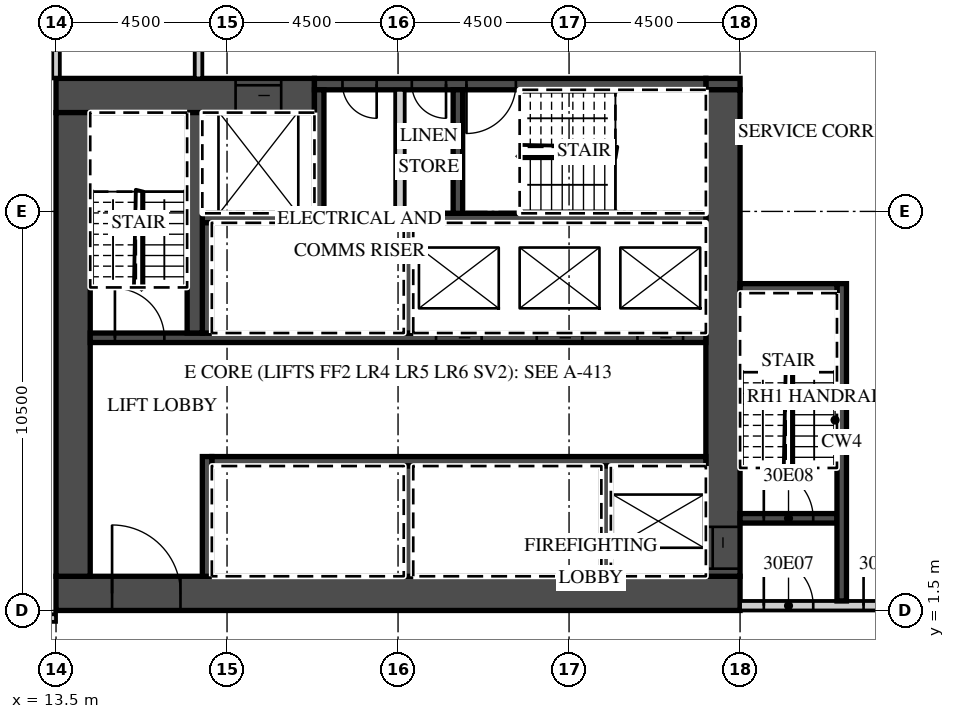
"""IFC4 building model, lengths in metres.
Left out: names, types, materials, properties, quantities, classifications, styles, units other than length and angle.
Written with IfcOpenShell. Run it as: python <this file> out.ifc"""

import sys

from ifc_helpers import new_model, si_unit, direction, frame, frame_2d, origin, place, context, subcontext, project, spatial, rectangle, extrude, element, fill, save


model = new_model("IFC4")
c1 = context("Model", 3, precision=1e-05, world=origin(), true_north=direction((0.0, 1.0)))
c2 = subcontext(c1, "Body", "Model", "MODEL_VIEW")
j1 = project(units=[si_unit("LENGTHUNIT", "METRE"), si_unit("PLANEANGLEUNIT", "RADIAN")], contexts=[c1])
p1 = place(None, origin())
s1 = spatial("IfcSite", under=j1, at=p1, CompositionType="ELEMENT")
p2 = place(p1, origin())
s2 = spatial("IfcBuilding", under=s1, at=p2, CompositionType="ELEMENT")
p3 = place(p2, frame((0.0, 0.0, 133.9)))
s3 = spatial("IfcBuildingStorey", under=s2, at=p3, CompositionType="ELEMENT", Elevation=133.9)
p4 = place(p3, frame((13.5, 15.5, 0.0), z_axis=(0.0, 0.0, 1.0), x_axis=(0.0, 1.0, 0.0)))
e1 = element("IfcWall", 1, at=p4, inside=s3, PredefinedType="PARTITIONING", context=c2, shape_type="SweptSolid", body=[
    extrude(rectangle(XDim=7.162, YDim=0.2, at=frame_2d((3.581, 0.0))), origin(), (0.0, 0.0, 1.0), 3.02),
])
p5 = place(p3, frame((-39.316, 1.3, 0.0), z_axis=(0.0, 0.0, 1.0), x_axis=(1.0, 0.0, 0.0)))
e2 = element("IfcWall", 2, at=p5, inside=s3, PredefinedType="PARTITIONING", context=c2, shape_type="SweptSolid", body=[
    extrude(rectangle(XDim=52.816, YDim=0.2, at=frame_2d((26.408, 0.0))), origin(), (0.0, 0.0, 1.0), 3.02),
])
p6 = place(p5, frame((0.15, 0.0, 0.0)))
e3 = element("IfcOpeningElement", 3, at=p6, cuts=e2, PredefinedType="OPENING", context=c2, shape_type="SweptSolid", body=[
    extrude(rectangle(XDim=0.9, YDim=2.1, at=frame_2d((0.45, 1.05))), frame((0.0, 0.11, 0.0), z_axis=(0.0, -1.0, 0.0), x_axis=(1.0, 0.0, 0.0)), (0.0, 0.0, 1.0), 0.22),
])
p7 = place(p5, frame((8.679, 0.0, 0.0)))
e4 = element("IfcOpeningElement", 4, at=p7, cuts=e2, PredefinedType="OPENING", context=c2, shape_type="SweptSolid", body=[
    extrude(rectangle(XDim=1.2, YDim=2.1, at=frame_2d((0.6, 1.05))), frame((0.0, 0.11, 0.0), z_axis=(0.0, -1.0, 0.0), x_axis=(1.0, 0.0, 0.0)), (0.0, 0.0, 1.0), 0.22),
])
p8 = place(p5, frame((14.754, 0.0, 0.0)))
e5 = element("IfcOpeningElement", 5, at=p8, cuts=e2, PredefinedType="OPENING", context=c2, shape_type="SweptSolid", body=[
    extrude(rectangle(XDim=1.2, YDim=2.1, at=frame_2d((0.6, 1.05))), frame((0.0, 0.11, 0.0), z_axis=(0.0, -1.0, 0.0), x_axis=(1.0, 0.0, 0.0)), (0.0, 0.0, 1.0), 0.22),
])
p9 = place(p5, frame((26.678, 0.0, 0.0)))
e6 = element("IfcOpeningElement", 6, at=p9, cuts=e2, PredefinedType="OPENING", context=c2, shape_type="SweptSolid", body=[
    extrude(rectangle(XDim=1.2, YDim=2.1, at=frame_2d((0.6, 1.05))), frame((0.0, 0.11, 0.0), z_axis=(0.0, -1.0, 0.0), x_axis=(1.0, 0.0, 0.0)), (0.0, 0.0, 1.0), 0.22),
])
p10 = place(p5, frame((33.266, 0.0, 0.0)))
e7 = element("IfcOpeningElement", 7, at=p10, cuts=e2, PredefinedType="OPENING", context=c2, shape_type="SweptSolid", body=[
    extrude(rectangle(XDim=1.0, YDim=2.1, at=frame_2d((0.5, 1.05))), frame((0.0, 0.11, 0.0), z_axis=(0.0, -1.0, 0.0), x_axis=(1.0, 0.0, 0.0)), (0.0, 0.0, 1.0), 0.22),
])
p11 = place(p5, frame((37.741, 0.0, 0.0)))
e8 = element("IfcOpeningElement", 8, at=p11, cuts=e2, PredefinedType="OPENING", context=c2, shape_type="SweptSolid", body=[
    extrude(rectangle(XDim=1.0, YDim=2.1, at=frame_2d((0.5, 1.05))), frame((0.0, 0.11, 0.0), z_axis=(0.0, -1.0, 0.0), x_axis=(1.0, 0.0, 0.0)), (0.0, 0.0, 1.0), 0.22),
])
p12 = place(p5, frame((41.754, 0.0, 0.0)))
e9 = element("IfcOpeningElement", 9, at=p12, cuts=e2, PredefinedType="OPENING", context=c2, shape_type="SweptSolid", body=[
    extrude(rectangle(XDim=1.2, YDim=2.1, at=frame_2d((0.6, 1.05))), frame((0.0, 0.11, 0.0), z_axis=(0.0, -1.0, 0.0), x_axis=(1.0, 0.0, 0.0)), (0.0, 0.0, 1.0), 0.22),
])
p13 = place(p5, frame((51.241, 0.0, 0.0)))
e10 = element("IfcOpeningElement", 10, at=p13, cuts=e2, PredefinedType="OPENING", context=c2, shape_type="SweptSolid", body=[
    extrude(rectangle(XDim=1.0, YDim=2.1, at=frame_2d((0.5, 1.05))), frame((0.0, 0.11, 0.0), z_axis=(0.0, -1.0, 0.0), x_axis=(1.0, 0.0, 0.0)), (0.0, 0.0, 1.0), 0.22),
])
p14 = place(p3, frame((13.5, 1.95, 0.0), z_axis=(0.0, 0.0, 1.0), x_axis=(1.0, 0.0, 0.0)))
e11 = element("IfcWall", 11, at=p14, inside=s3, PredefinedType="SHEAR", context=c2, shape_type="SweptSolid", body=[
    extrude(rectangle(XDim=18.0, YDim=0.9, at=frame_2d((9.0, 0.0))), origin(), (0.0, 0.0, 1.0), 3.02),
])
p15 = place(p14, frame((1.475, 0.0, 0.0)))
e12 = element("IfcOpeningElement", 12, at=p15, cuts=e11, PredefinedType="OPENING", context=c2, shape_type="SweptSolid", body=[
    extrude(rectangle(XDim=1.8, YDim=2.1, at=frame_2d((0.9, 1.05))), frame((0.0, 0.46, 0.0), z_axis=(0.0, -1.0, 0.0), x_axis=(1.0, 0.0, 0.0)), (0.0, 0.0, 1.0), 0.92),
])
p16 = place(p3, frame((13.5, 15.05, 0.0), z_axis=(0.0, 0.0, 1.0), x_axis=(1.0, 0.0, 0.0)))
e13 = element("IfcWall", 13, at=p16, inside=s3, PredefinedType="SHEAR", context=c2, shape_type="SweptSolid", body=[
    extrude(rectangle(XDim=6.8, YDim=0.9, at=frame_2d((3.4, 0.0))), origin(), (0.0, 0.0, 1.0), 3.02),
])
p17 = place(p16, frame((4.725, 0.0, 0.0)))
e14 = element("IfcOpeningElement", 14, at=p17, cuts=e13, PredefinedType="OPENING", context=c2, shape_type="SweptSolid", body=[
    extrude(rectangle(XDim=1.2, YDim=2.1, at=frame_2d((0.6, 1.05))), frame((0.0, 0.46, 0.0), z_axis=(0.0, -1.0, 0.0), x_axis=(1.0, 0.0, 0.0)), (0.0, 0.0, 1.0), 0.92),
])
p18 = place(p3, frame((30.6, 15.35, 0.0), z_axis=(0.0, 0.0, 1.0), x_axis=(1.0, 0.0, 0.0)))
e15 = element("IfcWall", 15, at=p18, inside=s3, PredefinedType="SHEAR", context=c2, shape_type="SweptSolid", body=[
    extrude(rectangle(XDim=0.9, YDim=0.3, at=frame_2d((0.45, 0.0))), origin(), (0.0, 0.0, 1.0), 3.02),
])
p19 = place(p3, frame((20.3, 15.35, 0.0), z_axis=(0.0, 0.0, 1.0), x_axis=(1.0, 0.0, 0.0)))
e16 = element("IfcWall", 16, at=p19, inside=s3, PredefinedType="SHEAR", context=c2, shape_type="SweptSolid", body=[
    extrude(rectangle(XDim=10.3, YDim=0.3, at=frame_2d((5.15, 0.0))), origin(), (0.0, 0.0, 1.0), 3.02),
])
p20 = place(p19, frame((4.0, 0.0, 0.0)))
e17 = element("IfcOpeningElement", 17, at=p20, cuts=e16, PredefinedType="OPENING", context=c2, shape_type="SweptSolid", body=[
    extrude(rectangle(XDim=1.3, YDim=2.1, at=frame_2d((0.65, 1.05))), frame((0.0, 0.16, 0.0), z_axis=(0.0, -1.0, 0.0), x_axis=(1.0, 0.0, 0.0)), (0.0, 0.0, 1.0), 0.32),
])
p21 = place(p19, frame((2.562, 0.0, 0.0)))
e18 = element("IfcOpeningElement", 18, at=p21, cuts=e16, PredefinedType="OPENING", context=c2, shape_type="SweptSolid", body=[
    extrude(rectangle(XDim=0.9, YDim=2.1, at=frame_2d((0.45, 1.05))), frame((0.0, 0.16, 0.0), z_axis=(0.0, -1.0, 0.0), x_axis=(1.0, 0.0, 0.0)), (0.0, 0.0, 1.0), 0.32),
])
p22 = place(p19, frame((0.738, 0.0, 0.0)))
e19 = element("IfcOpeningElement", 19, at=p22, cuts=e16, PredefinedType="OPENING", context=c2, shape_type="SweptSolid", body=[
    extrude(rectangle(XDim=0.9, YDim=2.1, at=frame_2d((0.45, 1.05))), frame((0.0, 0.16, 0.0), z_axis=(0.0, -1.0, 0.0), x_axis=(1.0, 0.0, 0.0)), (0.0, 0.0, 1.0), 0.32),
])
p23 = place(p3, frame((31.05, 2.4, 0.0), z_axis=(0.0, 0.0, 1.0), x_axis=(0.0, 1.0, 0.0)))
e20 = element("IfcWall", 20, at=p23, inside=s3, PredefinedType="SHEAR", context=c2, shape_type="SweptSolid", body=[
    extrude(rectangle(XDim=12.8, YDim=0.9, at=frame_2d((6.4, 0.0))), origin(), (0.0, 0.0, 1.0), 3.02),
])
p24 = place(p23, frame((0.2, 0.0, 0.0)))
e21 = element("IfcOpeningElement", 21, at=p24, cuts=e20, PredefinedType="OPENING", context=c2, shape_type="SweptSolid", body=[
    extrude(rectangle(XDim=1.1, YDim=2.1, at=frame_2d((0.55, 1.05))), frame((0.0, 0.46, 0.0), z_axis=(0.0, -1.0, 0.0), x_axis=(1.0, 0.0, 0.0)), (0.0, 0.0, 1.0), 0.92),
])
p25 = place(p3, frame((13.95, 2.4, 0.0), z_axis=(0.0, 0.0, 1.0), x_axis=(0.0, 1.0, 0.0)))
e22 = element("IfcWall", 22, at=p25, inside=s3, PredefinedType="SHEAR", context=c2, shape_type="SweptSolid", body=[
    extrude(rectangle(XDim=12.2, YDim=0.9, at=frame_2d((6.1, 0.0))), origin(), (0.0, 0.0, 1.0), 3.02),
])
p26 = place(p3, frame((17.6, 5.425, 0.0), z_axis=(0.0, 0.0, 1.0), x_axis=(1.0, 0.0, 0.0)))
e23 = element("IfcWall", 23, at=p26, inside=s3, PredefinedType="SHEAR", context=c2, shape_type="SweptSolid", body=[
    extrude(rectangle(XDim=13.0, YDim=0.25, at=frame_2d((6.5, 0.0))), origin(), (0.0, 0.0, 1.0), 3.02),
])
p27 = place(p3, frame((17.475, 2.4, 0.0), z_axis=(0.0, 0.0, 1.0), x_axis=(0.0, 1.0, 0.0)))
e24 = element("IfcWall", 24, at=p27, inside=s3, PredefinedType="SHEAR", context=c2, shape_type="SweptSolid", body=[
    extrude(rectangle(XDim=3.15, YDim=0.25, at=frame_2d((1.575, 0.0))), origin(), (0.0, 0.0, 1.0), 3.02),
])
for number, where, z_axis, x_axis in (
    (25, (27.975, 2.4, 0.0), (0.0, 0.0, 1.0), (0.0, 1.0, 0.0)),
    (26, (22.775, 2.4, 0.0), (0.0, 0.0, 1.0), (0.0, 1.0, 0.0)),
):
    element("IfcWall", number, at=place(p3, frame(where, z_axis=z_axis, x_axis=x_axis)), inside=s3, PredefinedType="SHEAR", context=c2, shape_type="SweptSolid", body=[
        extrude(rectangle(XDim=2.9, YDim=0.25, at=frame_2d((1.45, 0.0))), origin(), (0.0, 0.0, 1.0), 3.02),
    ])
p28 = place(p3, frame((14.4, 8.675, 0.0), z_axis=(0.0, 0.0, 1.0), x_axis=(1.0, 0.0, 0.0)))
e27 = element("IfcWall", 27, at=p28, inside=s3, PredefinedType="SHEAR", context=c2, shape_type="SweptSolid", body=[
    extrude(rectangle(XDim=16.2, YDim=0.25, at=frame_2d((8.1, 0.0))), origin(), (0.0, 0.0, 1.0), 3.02),
])
p29 = place(p28, frame((14.4, 0.0, 0.0)))
e28 = element("IfcOpeningElement", 28, at=p29, cuts=e27, PredefinedType="OPENING", context=c2, shape_type="SweptSolid", body=[
    extrude(rectangle(XDim=1.2, YDim=2.1, at=frame_2d((0.6, 1.05))), frame((0.0, 0.135, 0.0), z_axis=(0.0, -1.0, 0.0), x_axis=(1.0, 0.0, 0.0)), (0.0, 0.0, 1.0), 0.27),
])
p30 = place(p28, frame((11.75, 0.0, 0.0)))
e29 = element("IfcOpeningElement", 29, at=p30, cuts=e27, PredefinedType="OPENING", context=c2, shape_type="SweptSolid", body=[
    extrude(rectangle(XDim=1.2, YDim=2.1, at=frame_2d((0.6, 1.05))), frame((0.0, 0.135, 0.0), z_axis=(0.0, -1.0, 0.0), x_axis=(1.0, 0.0, 0.0)), (0.0, 0.0, 1.0), 0.27),
])
p31 = place(p28, frame((9.1, 0.0, 0.0)))
e30 = element("IfcOpeningElement", 30, at=p31, cuts=e27, PredefinedType="OPENING", context=c2, shape_type="SweptSolid", body=[
    extrude(rectangle(XDim=1.2, YDim=2.1, at=frame_2d((0.6, 1.05))), frame((0.0, 0.135, 0.0), z_axis=(0.0, -1.0, 0.0), x_axis=(1.0, 0.0, 0.0)), (0.0, 0.0, 1.0), 0.27),
])
p32 = place(p28, frame((0.65, 0.0, 0.0)))
e31 = element("IfcOpeningElement", 31, at=p32, cuts=e27, PredefinedType="OPENING", context=c2, shape_type="SweptSolid", body=[
    extrude(rectangle(XDim=1.3, YDim=2.1, at=frame_2d((0.65, 1.05))), frame((0.0, 0.135, 0.0), z_axis=(0.0, -1.0, 0.0), x_axis=(1.0, 0.0, 0.0)), (0.0, 0.0, 1.0), 0.27),
])
p33 = place(p3, frame((17.35, 11.825, 0.0), z_axis=(0.0, 0.0, 1.0), x_axis=(1.0, 0.0, 0.0)))
e32 = element("IfcWall", 32, at=p33, inside=s3, PredefinedType="SHEAR", context=c2, shape_type="SweptSolid", body=[
    extrude(rectangle(XDim=13.25, YDim=0.25, at=frame_2d((6.625, 0.0))), origin(), (0.0, 0.0, 1.0), 3.02),
])
for number, where, z_axis, x_axis in (
    (33, (17.475, 8.8, 0.0), (0.0, 0.0, 1.0), (0.0, 1.0, 0.0)),
    (34, (22.775, 8.8, 0.0), (0.0, 0.0, 1.0), (0.0, 1.0, 0.0)),
):
    element("IfcWall", number, at=place(p3, frame(where, z_axis=z_axis, x_axis=x_axis)), inside=s3, PredefinedType="SHEAR", context=c2, shape_type="SweptSolid", body=[
        extrude(rectangle(XDim=2.9, YDim=0.25, at=frame_2d((1.45, 0.0))), origin(), (0.0, 0.0, 1.0), 3.02),
    ])
p34 = place(p3, frame((17.15, 8.8, 0.0), z_axis=(0.0, 0.0, 1.0), x_axis=(0.0, 1.0, 0.0)))
e35 = element("IfcWall", 35, at=p34, inside=s3, PredefinedType="SHEAR", context=c2, shape_type="SweptSolid", body=[
    extrude(rectangle(XDim=5.8, YDim=0.4, at=frame_2d((2.9, 0.0))), origin(), (0.0, 0.0, 1.0), 3.02),
])
for number, where, z_axis, x_axis in (
    (36, (20.425, 11.95, 0.0), (0.0, 0.0, 1.0), (0.0, 1.0, 0.0)),
    (37, (24.075, 11.95, 0.0), (0.0, 0.0, 1.0), (0.0, 1.0, 0.0)),
):
    element("IfcWall", number, at=place(p3, frame(where, z_axis=z_axis, x_axis=x_axis)), inside=s3, PredefinedType="SHEAR", context=c2, shape_type="SweptSolid", body=[
        extrude(rectangle(XDim=3.25, YDim=0.25, at=frame_2d((1.625, 0.0))), origin(), (0.0, 0.0, 1.0), 3.02),
    ])
p35 = place(p3, frame((22.55, 11.95, 0.0), z_axis=(0.0, 0.0, 1.0), x_axis=(0.0, 1.0, 0.0)))
e38 = element("IfcWall", 38, at=p35, inside=s3, PredefinedType="PARTITIONING", context=c2, shape_type="SweptSolid", body=[
    extrude(rectangle(XDim=3.25, YDim=0.25, at=frame_2d((1.625, 0.0))), origin(), (0.0, 0.0, 1.0), 3.02),
])
p36 = place(p3, frame((31.5, 1.625, 0.0), z_axis=(0.0, 0.0, 1.0), x_axis=(1.0, 0.0, 0.0)))
e39 = element("IfcWall", 39, at=p36, inside=s3, PredefinedType="PARTITIONING", context=c2, shape_type="SweptSolid", body=[
    extrude(rectangle(XDim=15.65, YDim=0.25, at=frame_2d((7.825, 0.0))), origin(), (0.0, 0.0, 1.0), 3.02),
])
p37 = place(p36, frame((0.625, 0.0, 0.0)))
e40 = element("IfcOpeningElement", 40, at=p37, cuts=e39, PredefinedType="OPENING", context=c2, shape_type="SweptSolid", body=[
    extrude(rectangle(XDim=1.3, YDim=2.1, at=frame_2d((0.65, 1.05))), frame((0.0, 0.135, 0.0), z_axis=(0.0, -1.0, 0.0), x_axis=(1.0, 0.0, 0.0)), (0.0, 0.0, 1.0), 0.27),
])
p38 = place(p36, frame((3.25, 0.0, 0.0)))
e41 = element("IfcOpeningElement", 41, at=p38, cuts=e39, PredefinedType="OPENING", context=c2, shape_type="SweptSolid", body=[
    extrude(rectangle(XDim=1.1, YDim=2.1, at=frame_2d((0.55, 1.05))), frame((0.0, 0.135, 0.0), z_axis=(0.0, -1.0, 0.0), x_axis=(1.0, 0.0, 0.0)), (0.0, 0.0, 1.0), 0.27),
])
p39 = place(p3, frame((31.5, 3.925, 0.0), z_axis=(0.0, 0.0, 1.0), x_axis=(1.0, 0.0, 0.0)))
e42 = element("IfcWall", 42, at=p39, inside=s3, PredefinedType="SHEAR", context=c2, shape_type="SweptSolid", body=[
    extrude(rectangle(XDim=2.55, YDim=0.25, at=frame_2d((1.275, 0.0))), origin(), (0.0, 0.0, 1.0), 3.02),
])
p40 = place(p39, frame((0.625, 0.0, 0.0)))
e43 = element("IfcOpeningElement", 43, at=p40, cuts=e42, PredefinedType="OPENING", context=c2, shape_type="SweptSolid", body=[
    extrude(rectangle(XDim=1.3, YDim=2.1, at=frame_2d((0.65, 1.05))), frame((0.0, 0.135, 0.0), z_axis=(0.0, -1.0, 0.0), x_axis=(1.0, 0.0, 0.0)), (0.0, 0.0, 1.0), 0.27),
])
p41 = place(p3, frame((34.175, 1.75, 0.0), z_axis=(0.0, 0.0, 1.0), x_axis=(0.0, 1.0, 0.0)))
e44 = element("IfcWall", 44, at=p41, inside=s3, PredefinedType="SHEAR", context=c2, shape_type="SweptSolid", body=[
    extrude(rectangle(XDim=8.35, YDim=0.25, at=frame_2d((4.175, 0.0))), origin(), (0.0, 0.0, 1.0), 3.02),
])
p42 = place(p3, frame((31.5, 9.975, 0.0), z_axis=(0.0, 0.0, 1.0), x_axis=(1.0, 0.0, 0.0)))
e45 = element("IfcWall", 45, at=p42, inside=s3, PredefinedType="SHEAR", context=c2, shape_type="SweptSolid", body=[
    extrude(rectangle(XDim=2.55, YDim=0.25, at=frame_2d((1.275, 0.0))), origin(), (0.0, 0.0, 1.0), 3.02),
])
p43 = place(p3, frame((17.25, 15.5, 0.0), z_axis=(0.0, 0.0, 1.0), x_axis=(0.0, 1.0, 0.0)))
e46 = element("IfcWall", 46, at=p43, inside=s3, PredefinedType="PARTITIONING", context=c2, shape_type="SweptSolid", body=[
    extrude(rectangle(XDim=2.2, YDim=0.2, at=frame_2d((1.1, 0.0))), origin(), (0.0, 0.0, 1.0), 3.02),
])
p44 = place(p29, origin())
e47 = element("IfcDoor", 47, at=p44, inside=s3, OperationType="SLIDING_TO_LEFT", PredefinedType="DOOR", context=c2, shape_type="SweptSolid", body=[
    extrude(rectangle(XDim=1.2, YDim=2.1, at=frame_2d((0.6, 1.05))), frame((0.0, 0.025, 0.0), z_axis=(0.0, -1.0, 0.0), x_axis=(1.0, 0.0, 0.0)), (0.0, 0.0, 1.0), 0.05),
])
fill(e28, e47)
p45 = place(p30, origin())
e48 = element("IfcDoor", 48, at=p45, inside=s3, OperationType="SLIDING_TO_RIGHT", PredefinedType="DOOR", context=c2, shape_type="SweptSolid", body=[
    extrude(rectangle(XDim=1.2, YDim=2.1, at=frame_2d((0.6, 1.05))), frame((0.0, 0.025, 0.0), z_axis=(0.0, -1.0, 0.0), x_axis=(1.0, 0.0, 0.0)), (0.0, 0.0, 1.0), 0.05),
])
fill(e29, e48)
p46 = place(p31, origin())
e49 = element("IfcDoor", 49, at=p46, inside=s3, OperationType="SLIDING_TO_RIGHT", PredefinedType="DOOR", context=c2, shape_type="SweptSolid", body=[
    extrude(rectangle(XDim=1.2, YDim=2.1, at=frame_2d((0.6, 1.05))), frame((0.0, 0.025, 0.0), z_axis=(0.0, -1.0, 0.0), x_axis=(1.0, 0.0, 0.0)), (0.0, 0.0, 1.0), 0.05),
])
fill(e30, e49)
p47 = place(p17, origin())
e50 = element("IfcDoor", 50, at=p47, inside=s3, OperationType="SLIDING_TO_LEFT", PredefinedType="DOOR", context=c2, shape_type="SweptSolid", body=[
    extrude(rectangle(XDim=1.2, YDim=2.1, at=frame_2d((0.6, 1.05))), frame((0.0, 0.025, 0.0), z_axis=(0.0, -1.0, 0.0), x_axis=(1.0, 0.0, 0.0)), (0.0, 0.0, 1.0), 0.05),
])
fill(e14, e50)
p48 = place(p24, origin())
e51 = element("IfcDoor", 51, at=p48, inside=s3, OperationType="SLIDING_TO_LEFT", PredefinedType="DOOR", context=c2, shape_type="SweptSolid", body=[
    extrude(rectangle(XDim=1.1, YDim=2.1, at=frame_2d((0.55, 1.05))), frame((0.0, 0.025, 0.0), z_axis=(0.0, -1.0, 0.0), x_axis=(1.0, 0.0, 0.0)), (0.0, 0.0, 1.0), 0.05),
])
fill(e21, e51)
p49 = place(p15, origin())
e52 = element("IfcDoor", 52, at=p49, inside=s3, OperationType="DOUBLE_DOOR_DOUBLE_SWING", PredefinedType="DOOR", context=c2, shape_type="SweptSolid", body=[
    extrude(rectangle(XDim=1.8, YDim=2.1, at=frame_2d((0.9, 1.05))), frame((0.0, 0.025, 0.0), z_axis=(0.0, -1.0, 0.0), x_axis=(1.0, 0.0, 0.0)), (0.0, 0.0, 1.0), 0.05),
])
fill(e12, e52)
p50 = place(p37, origin())
e53 = element("IfcDoor", 53, at=p50, inside=s3, OperationType="SINGLE_SWING_LEFT", PredefinedType="DOOR", context=c2, shape_type="SweptSolid", body=[
    extrude(rectangle(XDim=1.3, YDim=2.1, at=frame_2d((0.65, 1.05))), frame((0.0, 0.025, 0.0), z_axis=(0.0, -1.0, 0.0), x_axis=(1.0, 0.0, 0.0)), (0.0, 0.0, 1.0), 0.05),
])
fill(e40, e53)
p51 = place(p40, origin())
e54 = element("IfcDoor", 54, at=p51, inside=s3, OperationType="SINGLE_SWING_LEFT", PredefinedType="DOOR", context=c2, shape_type="SweptSolid", body=[
    extrude(rectangle(XDim=1.3, YDim=2.1, at=frame_2d((0.65, 1.05))), frame((0.0, 0.025, 0.0), z_axis=(0.0, -1.0, 0.0), x_axis=(1.0, 0.0, 0.0)), (0.0, 0.0, 1.0), 0.05),
])
fill(e43, e54)
p52 = place(p38, origin())
e55 = element("IfcDoor", 55, at=p52, inside=s3, OperationType="SINGLE_SWING_LEFT", PredefinedType="DOOR", context=c2, shape_type="SweptSolid", body=[
    extrude(rectangle(XDim=1.1, YDim=2.1, at=frame_2d((0.55, 1.05))), frame((0.0, 0.025, 0.0), z_axis=(0.0, -1.0, 0.0), x_axis=(1.0, 0.0, 0.0)), (0.0, 0.0, 1.0), 0.05),
])
fill(e41, e55)
p53 = place(p32, origin())
e56 = element("IfcDoor", 56, at=p53, inside=s3, OperationType="SINGLE_SWING_LEFT", PredefinedType="DOOR", context=c2, shape_type="SweptSolid", body=[
    extrude(rectangle(XDim=1.3, YDim=2.1, at=frame_2d((0.65, 1.05))), frame((0.0, 0.025, 0.0), z_axis=(0.0, -1.0, 0.0), x_axis=(1.0, 0.0, 0.0)), (0.0, 0.0, 1.0), 0.05),
])
fill(e31, e56)
p54 = place(p20, origin())
e57 = element("IfcDoor", 57, at=p54, inside=s3, OperationType="SINGLE_SWING_LEFT", PredefinedType="DOOR", context=c2, shape_type="SweptSolid", body=[
    extrude(rectangle(XDim=1.3, YDim=2.1, at=frame_2d((0.65, 1.05))), frame((0.0, 0.025, 0.0), z_axis=(0.0, -1.0, 0.0), x_axis=(1.0, 0.0, 0.0)), (0.0, 0.0, 1.0), 0.05),
])
fill(e17, e57)
p55 = place(p21, origin())
e58 = element("IfcDoor", 58, at=p55, inside=s3, OperationType="SINGLE_SWING_RIGHT", PredefinedType="DOOR", context=c2, shape_type="SweptSolid", body=[
    extrude(rectangle(XDim=0.9, YDim=2.1, at=frame_2d((0.45, 1.05))), frame((0.0, 0.025, 0.0), z_axis=(0.0, -1.0, 0.0), x_axis=(1.0, 0.0, 0.0)), (0.0, 0.0, 1.0), 0.05),
])
fill(e18, e58)
p56 = place(p22, origin())
e59 = element("IfcDoor", 59, at=p56, inside=s3, OperationType="SINGLE_SWING_RIGHT", PredefinedType="DOOR", context=c2, shape_type="SweptSolid", body=[
    extrude(rectangle(XDim=0.9, YDim=2.1, at=frame_2d((0.45, 1.05))), frame((0.0, 0.025, 0.0), z_axis=(0.0, -1.0, 0.0), x_axis=(1.0, 0.0, 0.0)), (0.0, 0.0, 1.0), 0.05),
])
fill(e19, e59)
save(model, sys.argv[1])
